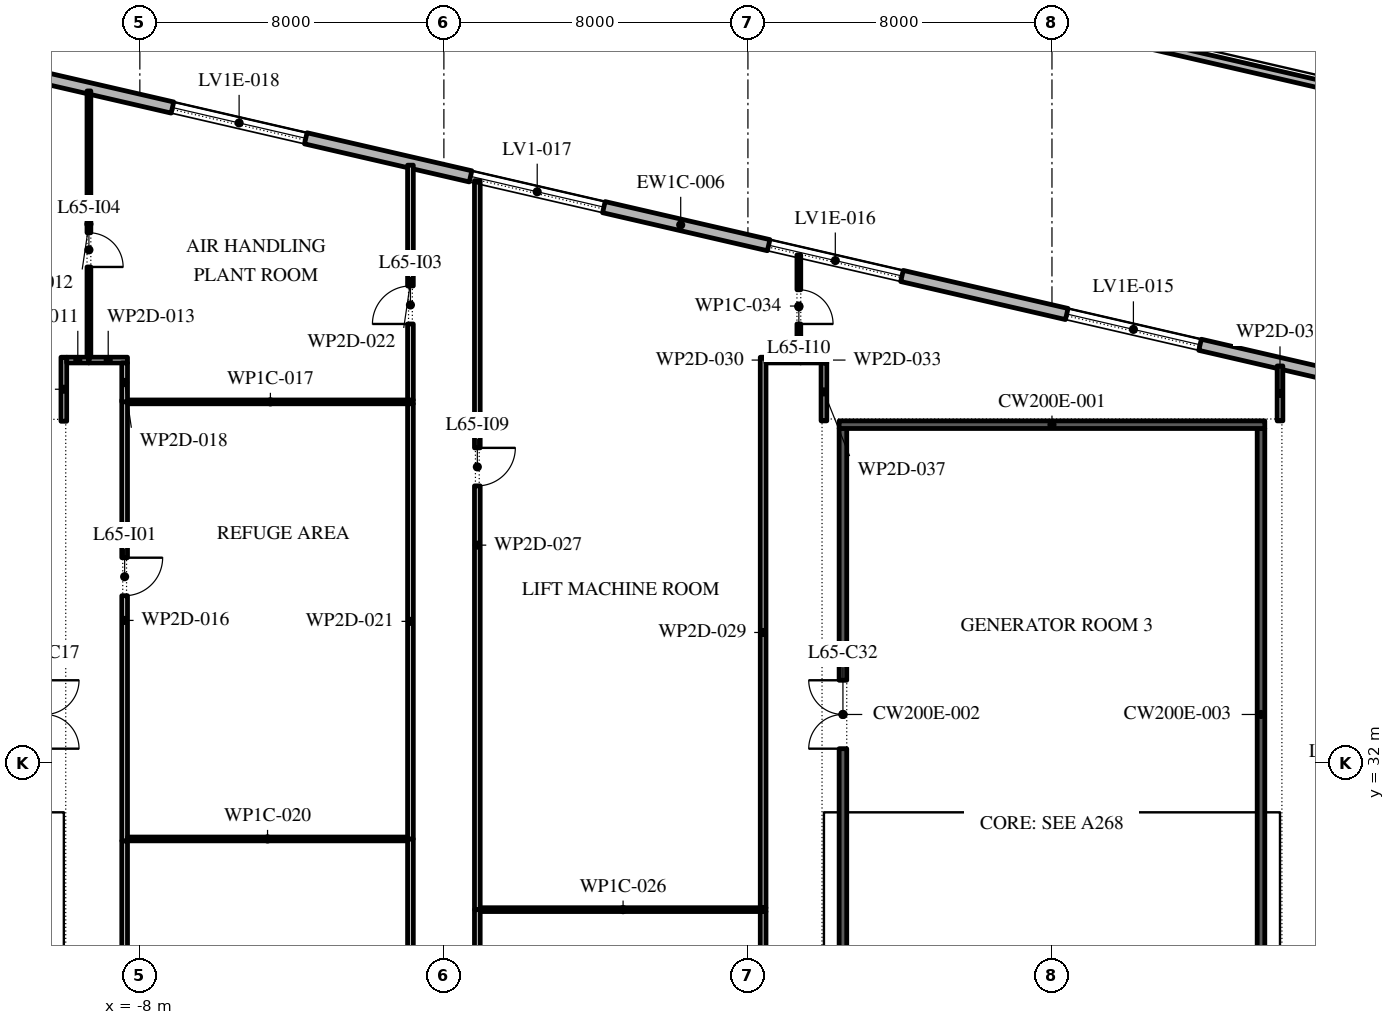
"""IFC4 building model, lengths in metres.
Left out: names, types, materials, properties, quantities, classifications, styles, units other than length and angle.
Written with IfcOpenShell. Run it as: python <this file> out.ifc"""

import sys

from ifc_helpers import new_model, si_unit, direction, frame, frame_2d, origin, place, context, subcontext, project, spatial, rectangle, extrude, element, fill, save


model = new_model("IFC4")
c1 = context("Model", 3, precision=1e-05, world=origin(), true_north=direction((0.0, 1.0)))
c2 = subcontext(c1, "Body", "Model", "MODEL_VIEW")
j1 = project(units=[si_unit("LENGTHUNIT", "METRE"), si_unit("PLANEANGLEUNIT", "RADIAN")], contexts=[c1])
p1 = place(None, origin())
s1 = spatial("IfcSite", under=j1, at=p1, CompositionType="ELEMENT")
p2 = place(p1, origin())
s2 = spatial("IfcBuilding", under=s1, at=p2, CompositionType="ELEMENT")
p3 = place(p2, frame((0.0, 0.0, 297.6)))
s3 = spatial("IfcBuildingStorey", under=s2, at=p3, CompositionType="ELEMENT", Elevation=297.6)
p4 = place(p3, frame((29.616, 40.758, 0.0), z_axis=(0.0, 0.0, 1.0), x_axis=(-0.974370532314, 0.224949029246, 0.0)))
e1 = element("IfcWall", 1, at=p4, inside=s3, PredefinedType="STANDARD", context=c2, shape_type="SweptSolid", body=[
    extrude(rectangle(XDim=48.0, YDim=0.3, at=frame_2d((24.0, 0.0))), origin(), (0.0, 0.0, 1.0), 4.95),
])
p5 = place(p4, frame((2.075, 0.0, 0.6)))
e2 = element("IfcOpeningElement", 2, at=p5, cuts=e1, PredefinedType="OPENING", context=c2, shape_type="SweptSolid", body=[
    extrude(rectangle(XDim=3.6, YDim=3.9, at=frame_2d((1.8, 1.95))), frame((0.0, 0.16, 0.0), z_axis=(0.0, -1.0, 0.0), x_axis=(1.0, 0.0, 0.0)), (0.0, 0.0, 1.0), 0.32),
])
p6 = place(p4, frame((9.975, 0.0, 0.6)))
e3 = element("IfcOpeningElement", 3, at=p6, cuts=e1, PredefinedType="OPENING", context=c2, shape_type="SweptSolid", body=[
    extrude(rectangle(XDim=3.6, YDim=3.55, at=frame_2d((1.8, 1.775))), frame((0.0, 0.16, 0.0), z_axis=(0.0, -1.0, 0.0), x_axis=(1.0, 0.0, 0.0)), (0.0, 0.0, 1.0), 0.32),
])
p7 = place(p4, frame((18.025, 0.0, 0.6)))
e4 = element("IfcOpeningElement", 4, at=p7, cuts=e1, PredefinedType="OPENING", context=c2, shape_type="SweptSolid", body=[
    extrude(rectangle(XDim=3.6, YDim=3.55, at=frame_2d((1.8, 1.775))), frame((0.0, 0.16, 0.0), z_axis=(0.0, -1.0, 0.0), x_axis=(1.0, 0.0, 0.0)), (0.0, 0.0, 1.0), 0.32),
])
p8 = place(p4, frame((26.075, 0.0, 0.6)))
e5 = element("IfcOpeningElement", 5, at=p8, cuts=e1, PredefinedType="OPENING", context=c2, shape_type="SweptSolid", body=[
    extrude(rectangle(XDim=3.6, YDim=3.9, at=frame_2d((1.8, 1.95))), frame((0.0, 0.16, 0.0), z_axis=(0.0, -1.0, 0.0), x_axis=(1.0, 0.0, 0.0)), (0.0, 0.0, 1.0), 0.32),
])
p9 = place(p4, frame((34.125, 0.0, 0.6)))
e6 = element("IfcOpeningElement", 6, at=p9, cuts=e1, PredefinedType="OPENING", context=c2, shape_type="SweptSolid", body=[
    extrude(rectangle(XDim=3.6, YDim=3.55, at=frame_2d((1.8, 1.775))), frame((0.0, 0.16, 0.0), z_axis=(0.0, -1.0, 0.0), x_axis=(1.0, 0.0, 0.0)), (0.0, 0.0, 1.0), 0.32),
])
p10 = place(p4, frame((42.175, 0.0, 0.6)))
e7 = element("IfcOpeningElement", 7, at=p10, cuts=e1, PredefinedType="OPENING", context=c2, shape_type="SweptSolid", body=[
    extrude(rectangle(XDim=3.6, YDim=3.9, at=frame_2d((1.8, 1.95))), frame((0.0, 0.16, 0.0), z_axis=(0.0, -1.0, 0.0), x_axis=(1.0, 0.0, 0.0)), (0.0, 0.0, 1.0), 0.32),
])
p11 = place(p3, frame((22.757, -13.982, -0.05), z_axis=(0.0, 0.0, 1.0), x_axis=(0.224947491476, 0.974370887331, 0.0)))
e8 = element("IfcWall", 8, at=p11, inside=s3, PredefinedType="STANDARD", context=c2, shape_type="SweptSolid", body=[
    extrude(rectangle(XDim=58.769, YDim=0.2, at=frame_2d((29.385, 0.0))), origin(), (0.0, 0.0, 1.0), 1.1),
])
p12 = place(p3, frame((33.159, 47.524, -0.05), z_axis=(0.0, 0.0, 1.0), x_axis=(-0.974370681559, 0.224948382787, 0.0)))
e9 = element("IfcWall", 9, at=p12, inside=s3, PredefinedType="STANDARD", context=c2, shape_type="SweptSolid", body=[
    extrude(rectangle(XDim=51.76, YDim=0.2, at=frame_2d((25.88, 0.0))), origin(), (0.0, 0.0, 1.0), 1.1),
])
p13 = place(p3, frame((21.5, 25.75, 0.0), z_axis=(0.0, 0.0, 1.0), x_axis=(0.0, 1.0, 0.0)))
e10 = element("IfcWall", 10, at=p13, inside=s3, PredefinedType="SHEAR", context=c2, shape_type="SweptSolid", body=[
    extrude(rectangle(XDim=15.05, YDim=0.2, at=frame_2d((7.525, 0.0))), origin(), (0.0, 0.0, 1.0), 4.95),
])
p14 = place(p3, frame((10.5, 25.75, 0.0), z_axis=(0.0, 0.0, 1.0), x_axis=(0.0, 1.0, 0.0)))
e11 = element("IfcWall", 11, at=p14, inside=s3, PredefinedType="SHEAR", context=c2, shape_type="SweptSolid", body=[
    extrude(rectangle(XDim=15.05, YDim=0.2, at=frame_2d((7.525, 0.0))), origin(), (0.0, 0.0, 1.0), 4.95),
])
p15 = place(p14, frame((6.625, 0.0, 0.0)))
e12 = element("IfcOpeningElement", 12, at=p15, cuts=e11, PredefinedType="OPENING", context=c2, shape_type="SweptSolid", body=[
    extrude(rectangle(XDim=1.8, YDim=2.4, at=frame_2d((0.9, 1.2))), frame((0.0, 0.11, 0.0), z_axis=(0.0, -1.0, 0.0), x_axis=(1.0, 0.0, 0.0)), (0.0, 0.0, 1.0), 0.22),
])
p16 = place(p3, frame((10.4, 40.9, 0.0), z_axis=(0.0, 0.0, 1.0), x_axis=(1.0, 0.0, 0.0)))
e13 = element("IfcWall", 13, at=p16, inside=s3, PredefinedType="SHEAR", context=c2, shape_type="SweptSolid", body=[
    extrude(rectangle(XDim=11.2, YDim=0.2, at=frame_2d((5.6, 0.0))), origin(), (0.0, 0.0, 1.0), 4.95),
])
p17 = place(p3, frame((-10.0, 40.99, 0.0), z_axis=(0.0, 0.0, 1.0), x_axis=(0.0, 1.0, 0.0)))
e14 = element("IfcWall", 14, at=p17, inside=s3, PredefinedType="PARTITIONING", context=c2, shape_type="SweptSolid", body=[
    extrude(rectangle(XDim=1.685, YDim=0.15, at=frame_2d((0.843, 0.0))), origin(), (0.0, 0.0, 1.0), 4.95),
])
p18 = place(p3, frame((-9.925, 42.6, 0.0), z_axis=(0.0, 0.0, 1.0), x_axis=(1.0, 0.0, 0.0)))
e15 = element("IfcWall", 15, at=p18, inside=s3, PredefinedType="PARTITIONING", context=c2, shape_type="SweptSolid", body=[
    extrude(rectangle(XDim=0.585, YDim=0.15, at=frame_2d((0.292, 0.0))), origin(), (0.0, 0.0, 1.0), 4.95),
])
p19 = place(p3, frame((-9.34, 42.675, 0.0), z_axis=(0.0, 0.0, 1.0), x_axis=(0.0, 1.0, 0.0)))
e16 = element("IfcWall", 16, at=p19, inside=s3, PredefinedType="PARTITIONING", context=c2, shape_type="SweptSolid", body=[
    extrude(rectangle(XDim=7.006, YDim=0.1, at=frame_2d((3.503, 0.0))), origin(), (0.0, 0.0, 1.0), 4.95),
])
p20 = place(p19, frame((2.375, 0.0, 0.0)))
e17 = element("IfcOpeningElement", 17, at=p20, cuts=e16, PredefinedType="OPENING", context=c2, shape_type="SweptSolid", body=[
    extrude(rectangle(XDim=0.9, YDim=2.1, at=frame_2d((0.45, 1.05))), frame((0.0, 0.06, 0.0), z_axis=(0.0, -1.0, 0.0), x_axis=(1.0, 0.0, 0.0)), (0.0, 0.0, 1.0), 0.12),
])
p21 = place(p3, frame((-9.34, 42.6, 0.0), z_axis=(0.0, 0.0, 1.0), x_axis=(1.0, 0.0, 0.0)))
e18 = element("IfcWall", 18, at=p21, inside=s3, PredefinedType="PARTITIONING", context=c2, shape_type="SweptSolid", body=[
    extrude(rectangle(XDim=1.015, YDim=0.15, at=frame_2d((0.508, 0.0))), origin(), (0.0, 0.0, 1.0), 4.95),
])
p22 = place(p3, frame((-8.4, 29.95, 0.0), z_axis=(0.0, 0.0, 1.0), x_axis=(0.0, -1.0, 0.0)))
e19 = element("IfcWall", 19, at=p22, inside=s3, PredefinedType="PARTITIONING", context=c2, shape_type="SweptSolid", body=[
    extrude(rectangle(XDim=10.875, YDim=0.15, at=frame_2d((5.438, 0.0))), origin(), (0.0, 0.0, 1.0), 4.95),
])
p23 = place(p22, frame((5.05, 0.0, 0.0)))
e20 = element("IfcOpeningElement", 20, at=p23, cuts=e19, PredefinedType="OPENING", context=c2, shape_type="SweptSolid", body=[
    extrude(rectangle(XDim=1.0, YDim=2.1, at=frame_2d((0.5, 1.05))), frame((0.0, 0.085, 0.0), z_axis=(0.0, -1.0, 0.0), x_axis=(1.0, 0.0, 0.0)), (0.0, 0.0, 1.0), 0.17),
])
p24 = place(p3, frame((-8.4, 41.55, 0.0), z_axis=(0.0, 0.0, 1.0), x_axis=(0.0, -1.0, 0.0)))
e21 = element("IfcWall", 21, at=p24, inside=s3, PredefinedType="PARTITIONING", context=c2, shape_type="SweptSolid", body=[
    extrude(rectangle(XDim=11.6, YDim=0.15, at=frame_2d((5.8, 0.0))), origin(), (0.0, 0.0, 1.0), 4.95),
])
p25 = place(p24, frame((4.15, 0.0, 0.0)))
e22 = element("IfcOpeningElement", 22, at=p25, cuts=e21, PredefinedType="OPENING", context=c2, shape_type="SweptSolid", body=[
    extrude(rectangle(XDim=1.0, YDim=2.1, at=frame_2d((0.5, 1.05))), frame((0.0, 0.085, 0.0), z_axis=(0.0, -1.0, 0.0), x_axis=(1.0, 0.0, 0.0)), (0.0, 0.0, 1.0), 0.17),
])
p26 = place(p3, frame((-8.325, 41.5, 0.0), z_axis=(0.0, 0.0, 1.0), x_axis=(1.0, 0.0, 0.0)))
e23 = element("IfcWall", 23, at=p26, inside=s3, PredefinedType="PARTITIONING", context=c2, shape_type="SweptSolid", body=[
    extrude(rectangle(XDim=7.52, YDim=0.1, at=frame_2d((3.76, 0.0))), origin(), (0.0, 0.0, 1.0), 4.95),
])
p27 = place(p3, frame((-8.4, 42.525, 0.0), z_axis=(0.0, 0.0, 1.0), x_axis=(0.0, -1.0, 0.0)))
e24 = element("IfcWall", 24, at=p27, inside=s3, PredefinedType="PARTITIONING", context=c2, shape_type="SweptSolid", body=[
    extrude(rectangle(XDim=1.025, YDim=0.15, at=frame_2d((0.512, 0.0))), origin(), (0.0, 0.0, 1.0), 4.95),
])
p28 = place(p3, frame((-0.88, 19.075, 0.0), z_axis=(0.0, 0.0, 1.0), x_axis=(0.0, 1.0, 0.0)))
e25 = element("IfcWall", 25, at=p28, inside=s3, PredefinedType="PARTITIONING", context=c2, shape_type="SweptSolid", body=[
    extrude(rectangle(XDim=10.925, YDim=0.15, at=frame_2d((5.462, 0.0))), origin(), (0.0, 0.0, 1.0), 4.95),
])
p29 = place(p3, frame((-0.955, 30.0, 0.0), z_axis=(0.0, 0.0, 1.0), x_axis=(-1.0, 0.0, 0.0)))
e26 = element("IfcWall", 26, at=p29, inside=s3, PredefinedType="PARTITIONING", context=c2, shape_type="SweptSolid", body=[
    extrude(rectangle(XDim=7.37, YDim=0.1, at=frame_2d((3.685, 0.0))), origin(), (0.0, 0.0, 1.0), 4.95),
])
p30 = place(p3, frame((-0.88, 30.0, 0.0), z_axis=(0.0, 0.0, 1.0), x_axis=(0.0, 1.0, 0.0)))
e27 = element("IfcWall", 27, at=p30, inside=s3, PredefinedType="PARTITIONING", context=c2, shape_type="SweptSolid", body=[
    extrude(rectangle(XDim=11.45, YDim=0.15, at=frame_2d((5.725, 0.0))), origin(), (0.0, 0.0, 1.0), 4.95),
])
p31 = place(p3, frame((-0.88, 41.55, 0.0), z_axis=(0.0, 0.0, 1.0), x_axis=(0.0, 1.0, 0.0)))
e28 = element("IfcWall", 28, at=p31, inside=s3, PredefinedType="PARTITIONING", context=c2, shape_type="SweptSolid", body=[
    extrude(rectangle(XDim=6.178, YDim=0.15, at=frame_2d((3.089, 0.0))), origin(), (0.0, 0.0, 1.0), 4.95),
])
p32 = place(p31, frame((2.0, 0.0, 0.0)))
e29 = element("IfcOpeningElement", 29, at=p32, cuts=e28, PredefinedType="OPENING", context=c2, shape_type="SweptSolid", body=[
    extrude(rectangle(XDim=1.0, YDim=2.1, at=frame_2d((0.5, 1.05))), frame((0.0, 0.085, 0.0), z_axis=(0.0, -1.0, 0.0), x_axis=(1.0, 0.0, 0.0)), (0.0, 0.0, 1.0), 0.17),
])
p33 = place(p3, frame((0.88, 28.14, 0.0), z_axis=(0.0, 0.0, 1.0), x_axis=(0.0, -1.0, 0.0)))
e30 = element("IfcWall", 30, at=p33, inside=s3, PredefinedType="PARTITIONING", context=c2, shape_type="SweptSolid", body=[
    extrude(rectangle(XDim=9.065, YDim=0.15, at=frame_2d((4.532, 0.0))), origin(), (0.0, 0.0, 1.0), 4.95),
])
p34 = place(p3, frame((0.955, 28.14, 0.0), z_axis=(0.0, 0.0, 1.0), x_axis=(1.0, 0.0, 0.0)))
e31 = element("IfcWall", 31, at=p34, inside=s3, PredefinedType="PARTITIONING", context=c2, shape_type="SweptSolid", body=[
    extrude(rectangle(XDim=7.52, YDim=0.1, at=frame_2d((3.76, 0.0))), origin(), (0.0, 0.0, 1.0), 4.95),
])
p35 = place(p3, frame((0.88, 47.321, 0.0), z_axis=(0.0, 0.0, 1.0), x_axis=(0.0, -1.0, 0.0)))
e32 = element("IfcWall", 32, at=p35, inside=s3, PredefinedType="PARTITIONING", context=c2, shape_type="SweptSolid", body=[
    extrude(rectangle(XDim=19.181, YDim=0.15, at=frame_2d((9.591, 0.0))), origin(), (0.0, 0.0, 1.0), 4.95),
])
p36 = place(p35, frame((7.031, 0.0, 0.0)))
e33 = element("IfcOpeningElement", 33, at=p36, cuts=e32, PredefinedType="OPENING", context=c2, shape_type="SweptSolid", body=[
    extrude(rectangle(XDim=1.0, YDim=2.1, at=frame_2d((0.5, 1.05))), frame((0.0, 0.085, 0.0), z_axis=(0.0, -1.0, 0.0), x_axis=(1.0, 0.0, 0.0)), (0.0, 0.0, 1.0), 0.17),
])
p37 = place(p3, frame((8.4, 19.075, 0.0), z_axis=(0.0, 0.0, 1.0), x_axis=(0.0, 1.0, 0.0)))
e34 = element("IfcWall", 34, at=p37, inside=s3, PredefinedType="PARTITIONING", context=c2, shape_type="SweptSolid", body=[
    extrude(rectangle(XDim=9.015, YDim=0.15, at=frame_2d((4.508, 0.0))), origin(), (0.0, 0.0, 1.0), 4.95),
])
p38 = place(p37, frame((5.915, 0.0, 0.0)))
e35 = element("IfcOpeningElement", 35, at=p38, cuts=e34, PredefinedType="OPENING", context=c2, shape_type="SweptSolid", body=[
    extrude(rectangle(XDim=1.0, YDim=2.1, at=frame_2d((0.5, 1.05))), frame((0.0, 0.085, 0.0), z_axis=(0.0, -1.0, 0.0), x_axis=(1.0, 0.0, 0.0)), (0.0, 0.0, 1.0), 0.17),
])
p39 = place(p3, frame((8.4, 28.19, 0.0), z_axis=(0.0, 0.0, 1.0), x_axis=(0.0, 1.0, 0.0)))
e36 = element("IfcWall", 36, at=p39, inside=s3, PredefinedType="PARTITIONING", context=c2, shape_type="SweptSolid", body=[
    extrude(rectangle(XDim=14.485, YDim=0.15, at=frame_2d((7.243, 0.0))), origin(), (0.0, 0.0, 1.0), 4.95),
])
p40 = place(p3, frame((8.475, 42.6, 0.0), z_axis=(0.0, 0.0, 1.0), x_axis=(1.0, 0.0, 0.0)))
e37 = element("IfcWall", 37, at=p40, inside=s3, PredefinedType="PARTITIONING", context=c2, shape_type="SweptSolid", body=[
    extrude(rectangle(XDim=0.915, YDim=0.15, at=frame_2d((0.458, 0.0))), origin(), (0.0, 0.0, 1.0), 4.95),
])
p41 = place(p3, frame((9.39, 42.6, 0.0), z_axis=(0.0, 0.0, 1.0), x_axis=(1.0, 0.0, 0.0)))
e38 = element("IfcWall", 38, at=p41, inside=s3, PredefinedType="PARTITIONING", context=c2, shape_type="SweptSolid", body=[
    extrude(rectangle(XDim=0.685, YDim=0.15, at=frame_2d((0.343, 0.0))), origin(), (0.0, 0.0, 1.0), 4.95),
])
p42 = place(p3, frame((9.34, 45.368, 0.0), z_axis=(0.0, 0.0, 1.0), x_axis=(0.0, -1.0, 0.0)))
e39 = element("IfcWall", 39, at=p42, inside=s3, PredefinedType="PARTITIONING", context=c2, shape_type="SweptSolid", body=[
    extrude(rectangle(XDim=2.693, YDim=0.1, at=frame_2d((1.346, 0.0))), origin(), (0.0, 0.0, 1.0), 4.95),
])
p43 = place(p42, frame((0.918, 0.0, 0.0)))
e40 = element("IfcOpeningElement", 40, at=p43, cuts=e39, PredefinedType="OPENING", context=c2, shape_type="SweptSolid", body=[
    extrude(rectangle(XDim=0.9, YDim=2.1, at=frame_2d((0.45, 1.05))), frame((0.0, 0.06, 0.0), z_axis=(0.0, -1.0, 0.0), x_axis=(1.0, 0.0, 0.0)), (0.0, 0.0, 1.0), 0.12),
])
p44 = place(p3, frame((10.0, 42.525, 0.0), z_axis=(0.0, 0.0, 1.0), x_axis=(0.0, -1.0, 0.0)))
e41 = element("IfcWall", 41, at=p44, inside=s3, PredefinedType="PARTITIONING", context=c2, shape_type="SweptSolid", body=[
    extrude(rectangle(XDim=1.525, YDim=0.15, at=frame_2d((0.762, 0.0))), origin(), (0.0, 0.0, 1.0), 4.95),
])
p45 = place(p3, frame((22.0, 41.0, 0.0), z_axis=(0.0, 0.0, 1.0), x_axis=(0.0, 1.0, 0.0)))
e42 = element("IfcWall", 42, at=p45, inside=s3, PredefinedType="PARTITIONING", context=c2, shape_type="SweptSolid", body=[
    extrude(rectangle(XDim=1.445, YDim=0.15, at=frame_2d((0.723, 0.0))), origin(), (0.0, 0.0, 1.0), 4.95),
])
p46 = place(p6, origin())
e43 = element("IfcWindow", 43, at=p46, inside=s3, PartitioningType="DOUBLE_PANEL_HORIZONTAL", PredefinedType="WINDOW", context=c2, shape_type="SweptSolid", body=[
    extrude(rectangle(XDim=3.6, YDim=3.55, at=frame_2d((1.8, 1.775))), frame((0.0, 0.03, 0.0), z_axis=(0.0, -1.0, 0.0), x_axis=(1.0, 0.0, 0.0)), (0.0, 0.0, 1.0), 0.06),
])
fill(e3, e43)
p47 = place(p7, origin())
e44 = element("IfcWindow", 44, at=p47, inside=s3, PartitioningType="DOUBLE_PANEL_HORIZONTAL", PredefinedType="WINDOW", context=c2, shape_type="SweptSolid", body=[
    extrude(rectangle(XDim=3.6, YDim=3.55, at=frame_2d((1.8, 1.775))), frame((0.0, 0.03, 0.0), z_axis=(0.0, -1.0, 0.0), x_axis=(1.0, 0.0, 0.0)), (0.0, 0.0, 1.0), 0.06),
])
fill(e4, e44)
p48 = place(p8, origin())
e45 = element("IfcWindow", 45, at=p48, inside=s3, PartitioningType="DOUBLE_PANEL_HORIZONTAL", PredefinedType="WINDOW", context=c2, shape_type="SweptSolid", body=[
    extrude(rectangle(XDim=3.6, YDim=3.9, at=frame_2d((1.8, 1.95))), frame((0.0, 0.03, 0.0), z_axis=(0.0, -1.0, 0.0), x_axis=(1.0, 0.0, 0.0)), (0.0, 0.0, 1.0), 0.06),
])
fill(e5, e45)
p49 = place(p9, origin())
e46 = element("IfcWindow", 46, at=p49, inside=s3, PartitioningType="DOUBLE_PANEL_HORIZONTAL", PredefinedType="WINDOW", context=c2, shape_type="SweptSolid", body=[
    extrude(rectangle(XDim=3.6, YDim=3.55, at=frame_2d((1.8, 1.775))), frame((0.0, 0.03, 0.0), z_axis=(0.0, -1.0, 0.0), x_axis=(1.0, 0.0, 0.0)), (0.0, 0.0, 1.0), 0.06),
])
fill(e6, e46)
p50 = place(p15, origin())
e47 = element("IfcDoor", 47, at=p50, inside=s3, OperationType="DOUBLE_DOOR_SINGLE_SWING", PredefinedType="DOOR", context=c2, shape_type="SweptSolid", body=[
    extrude(rectangle(XDim=1.8, YDim=2.4, at=frame_2d((0.9, 1.2))), frame((0.0, -0.05, 0.0), z_axis=(0.0, -1.0, 0.0), x_axis=(1.0, 0.0, 0.0)), (0.0, 0.0, 1.0), 0.05),
])
fill(e12, e47)
p51 = place(p25, origin())
e48 = element("IfcDoor", 48, at=p51, inside=s3, OperationType="SINGLE_SWING_RIGHT", PredefinedType="DOOR", context=c2, shape_type="SweptSolid", body=[
    extrude(rectangle(XDim=1.0, YDim=2.1, at=frame_2d((0.5, 1.05))), frame((0.0, 0.025, 0.0), z_axis=(0.0, -1.0, 0.0), x_axis=(1.0, 0.0, 0.0)), (0.0, 0.0, 1.0), 0.05),
])
fill(e22, e48)
p52 = place(p32, origin())
e49 = element("IfcDoor", 49, at=p52, inside=s3, OperationType="SINGLE_SWING_RIGHT", PredefinedType="DOOR", context=c2, shape_type="SweptSolid", body=[
    extrude(rectangle(XDim=1.0, YDim=2.1, at=frame_2d((0.5, 1.05))), frame((0.0, 0.025, 0.0), z_axis=(0.0, -1.0, 0.0), x_axis=(1.0, 0.0, 0.0)), (0.0, 0.0, 1.0), 0.05),
])
fill(e29, e49)
p53 = place(p20, frame((0.9, 0.0, 0.0), z_axis=(0.0, 0.0, 1.0), x_axis=(-1.0, 0.0, 0.0)))
e50 = element("IfcDoor", 50, at=p53, inside=s3, OperationType="SINGLE_SWING_LEFT", PredefinedType="DOOR", context=c2, shape_type="SweptSolid", body=[
    extrude(rectangle(XDim=0.9, YDim=2.1, at=frame_2d((0.45, 1.05))), frame((0.0, 0.025, 0.0), z_axis=(0.0, -1.0, 0.0), x_axis=(1.0, 0.0, 0.0)), (0.0, 0.0, 1.0), 0.05),
])
fill(e17, e50)
p54 = place(p36, origin())
e51 = element("IfcDoor", 51, at=p54, inside=s3, OperationType="SINGLE_SWING_RIGHT", PredefinedType="DOOR", context=c2, shape_type="SweptSolid", body=[
    extrude(rectangle(XDim=1.0, YDim=2.1, at=frame_2d((0.5, 1.05))), frame((0.0, 0.025, 0.0), z_axis=(0.0, -1.0, 0.0), x_axis=(1.0, 0.0, 0.0)), (0.0, 0.0, 1.0), 0.05),
])
fill(e33, e51)
p55 = place(p43, origin())
e52 = element("IfcDoor", 52, at=p55, inside=s3, OperationType="SINGLE_SWING_LEFT", PredefinedType="DOOR", context=c2, shape_type="SweptSolid", body=[
    extrude(rectangle(XDim=0.9, YDim=2.1, at=frame_2d((0.45, 1.05))), frame((0.0, 0.025, 0.0), z_axis=(0.0, -1.0, 0.0), x_axis=(1.0, 0.0, 0.0)), (0.0, 0.0, 1.0), 0.05),
])
fill(e40, e52)
save(model, sys.argv[1])
